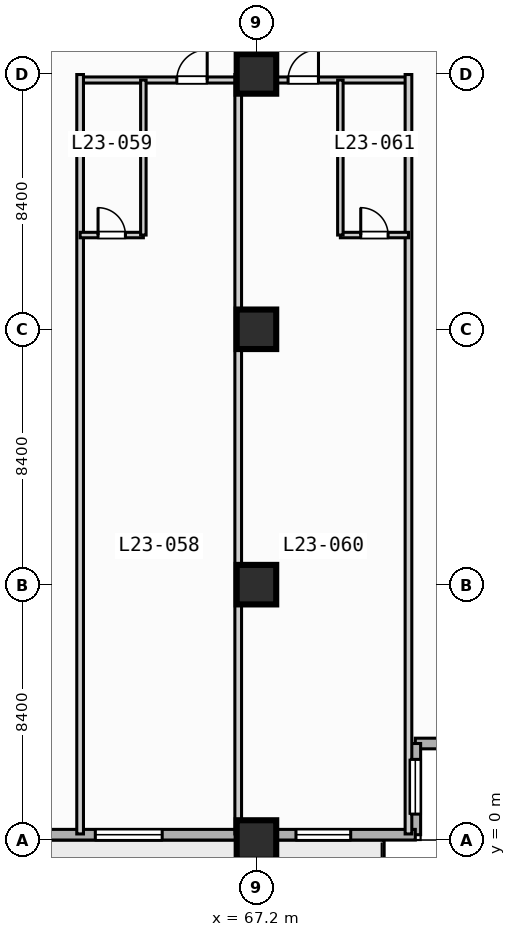
"""IFC4 building model, lengths in metres.
Left out: names, types, materials, properties, quantities, classifications, styles, units other than length and angle.
Written with IfcOpenShell. Run it as: python <this file> out.ifc"""

import sys

from ifc_helpers import new_model, si_unit, direction, frame, frame_2d, origin, origin_2d, place, context, subcontext, project, spatial, rectangle, extrude, element, fill, save


model = new_model("IFC4")
c1 = context("Model", 3, precision=1e-05, world=origin(), true_north=direction((0.0, 1.0)))
c2 = subcontext(c1, "Body", "Model", "MODEL_VIEW")
j1 = project(units=[si_unit("LENGTHUNIT", "METRE"), si_unit("PLANEANGLEUNIT", "RADIAN")], contexts=[c1])
p1 = place(None, origin())
s1 = spatial("IfcSite", under=j1, at=p1, CompositionType="ELEMENT")
p2 = place(p1, origin())
s2 = spatial("IfcBuilding", under=s1, at=p2, CompositionType="ELEMENT")
p3 = place(p2, frame((0.0, 0.0, 100.0)))
s3 = spatial("IfcBuildingStorey", under=s2, at=p3, CompositionType="ELEMENT", Elevation=100.0)
for number, where, z_axis, x_axis in (
    (1, (67.2, 0.0, 0.0), (0.0, 0.0, 1.0), (1.0, 0.0, 0.0)),
    (2, (67.2, 8.4, 0.0), (0.0, 0.0, 1.0), (1.0, 0.0, 0.0)),
    (3, (67.2, 16.8, 0.0), (0.0, 0.0, 1.0), (1.0, 0.0, 0.0)),
    (4, (67.2, 25.2, 0.0), (0.0, 0.0, 1.0), (1.0, 0.0, 0.0)),
):
    element("IfcColumn", number, at=place(p3, frame(where, z_axis=z_axis, x_axis=x_axis)), inside=s3, PredefinedType="COLUMN", context=c2, shape_type="SweptSolid", body=[
        extrude(rectangle(XDim=1.3, YDim=1.3, at=origin_2d()), origin(), (0.0, 0.0, 1.0), 3.8),
    ])
p4 = place(p3, frame((75.425, 3.175, 0.0), z_axis=(0.0, 0.0, 1.0), x_axis=(-1.0, 0.0, 0.0)))
e5 = element("IfcWall", 5, at=p4, inside=s3, PredefinedType="STANDARD", context=c2, shape_type="SweptSolid", body=[
    extrude(rectangle(XDim=3.0, YDim=0.35, at=frame_2d((1.5, 0.0))), origin(), (0.0, 0.0, 1.0), 3.55),
])
p5 = place(p3, frame((72.425, 3.175, 0.0), z_axis=(0.0, 0.0, 1.0), x_axis=(0.0, -1.0, 0.0)))
e6 = element("IfcWall", 6, at=p5, inside=s3, PredefinedType="STANDARD", context=c2, shape_type="SweptSolid", body=[
    extrude(rectangle(XDim=3.0, YDim=0.35, at=frame_2d((1.5, 0.0))), origin(), (0.0, 0.0, 1.0), 3.55),
])
p6 = place(p5, frame((0.522, 0.0, 0.85)))
e7 = element("IfcOpeningElement", 7, at=p6, cuts=e6, PredefinedType="OPENING", context=c2, shape_type="SweptSolid", body=[
    extrude(rectangle(XDim=1.8, YDim=1.8, at=frame_2d((0.9, 0.9))), frame((0.0, 0.185, 0.0), z_axis=(0.0, -1.0, 0.0), x_axis=(1.0, 0.0, 0.0)), (0.0, 0.0, 1.0), 0.37),
])
p7 = place(p3, frame((72.425, 0.175, 0.0), z_axis=(0.0, 0.0, 1.0), x_axis=(-1.0, 0.0, 0.0)))
e8 = element("IfcWall", 8, at=p7, inside=s3, PredefinedType="STANDARD", context=c2, shape_type="SweptSolid", body=[
    extrude(rectangle(XDim=69.25, YDim=0.35, at=frame_2d((34.625, 0.0))), origin(), (0.0, 0.0, 1.0), 3.55),
])
p8 = place(p7, frame((50.225, 0.0, 0.0)))
e9 = element("IfcOpeningElement", 9, at=p8, cuts=e8, PredefinedType="OPENING", context=c2, shape_type="SweptSolid", body=[
    extrude(rectangle(XDim=1.4, YDim=2.2, at=frame_2d((0.7, 1.1))), frame((0.0, 0.185, 0.0), z_axis=(0.0, -1.0, 0.0), x_axis=(1.0, 0.0, 0.0)), (0.0, 0.0, 1.0), 0.37),
])
p9 = place(p7, frame((33.525, 0.0, 0.85)))
e10 = element("IfcOpeningElement", 10, at=p9, cuts=e8, PredefinedType="OPENING", context=c2, shape_type="SweptSolid", body=[
    extrude(rectangle(XDim=2.2, YDim=1.8, at=frame_2d((1.1, 0.9))), frame((0.0, 0.185, 0.0), z_axis=(0.0, -1.0, 0.0), x_axis=(1.0, 0.0, 0.0)), (0.0, 0.0, 1.0), 0.37),
])
p10 = place(p7, frame((25.125, 0.0, 0.85)))
e11 = element("IfcOpeningElement", 11, at=p10, cuts=e8, PredefinedType="OPENING", context=c2, shape_type="SweptSolid", body=[
    extrude(rectangle(XDim=2.2, YDim=1.8, at=frame_2d((1.1, 0.9))), frame((0.0, 0.185, 0.0), z_axis=(0.0, -1.0, 0.0), x_axis=(1.0, 0.0, 0.0)), (0.0, 0.0, 1.0), 0.37),
])
p11 = place(p7, frame((8.325, 0.0, 0.85)))
e12 = element("IfcOpeningElement", 12, at=p11, cuts=e8, PredefinedType="OPENING", context=c2, shape_type="SweptSolid", body=[
    extrude(rectangle(XDim=2.2, YDim=1.8, at=frame_2d((1.1, 0.9))), frame((0.0, 0.185, 0.0), z_axis=(0.0, -1.0, 0.0), x_axis=(1.0, 0.0, 0.0)), (0.0, 0.0, 1.0), 0.37),
])
p12 = place(p7, frame((64.925, 0.0, 0.85)))
e13 = element("IfcOpeningElement", 13, at=p12, cuts=e8, PredefinedType="OPENING", context=c2, shape_type="SweptSolid", body=[
    extrude(rectangle(XDim=1.8, YDim=1.8, at=frame_2d((0.9, 0.9))), frame((0.0, 0.185, 0.0), z_axis=(0.0, -1.0, 0.0), x_axis=(1.0, 0.0, 0.0)), (0.0, 0.0, 1.0), 0.37),
])
p13 = place(p7, frame((56.525, 0.0, 0.85)))
e14 = element("IfcOpeningElement", 14, at=p13, cuts=e8, PredefinedType="OPENING", context=c2, shape_type="SweptSolid", body=[
    extrude(rectangle(XDim=1.8, YDim=1.8, at=frame_2d((0.9, 0.9))), frame((0.0, 0.185, 0.0), z_axis=(0.0, -1.0, 0.0), x_axis=(1.0, 0.0, 0.0)), (0.0, 0.0, 1.0), 0.37),
])
p14 = place(p7, frame((2.125, 0.0, 0.85)))
e15 = element("IfcOpeningElement", 15, at=p14, cuts=e8, PredefinedType="OPENING", context=c2, shape_type="SweptSolid", body=[
    extrude(rectangle(XDim=1.8, YDim=1.8, at=frame_2d((0.9, 0.9))), frame((0.0, 0.185, 0.0), z_axis=(0.0, -1.0, 0.0), x_axis=(1.0, 0.0, 0.0)), (0.0, 0.0, 1.0), 0.37),
])
p15 = place(p3, frame((61.4, 25.0, 0.0), z_axis=(0.0, 0.0, 1.0), x_axis=(1.0, 0.0, 0.0)))
e16 = element("IfcWall", 16, at=p15, inside=s3, PredefinedType="PARTITIONING", context=c2, shape_type="SweptSolid", body=[
    extrude(rectangle(XDim=10.8, YDim=0.2, at=frame_2d((5.4, 0.0))), origin(), (0.0, 0.0, 1.0), 2.8),
])
p16 = place(p15, frame((3.18, 0.0, 0.0)))
e17 = element("IfcOpeningElement", 17, at=p16, cuts=e16, PredefinedType="OPENING", context=c2, shape_type="SweptSolid", body=[
    extrude(rectangle(XDim=1.0, YDim=2.15, at=frame_2d((0.5, 1.075))), frame((0.0, 0.11, 0.0), z_axis=(0.0, -1.0, 0.0), x_axis=(1.0, 0.0, 0.0)), (0.0, 0.0, 1.0), 0.22),
])
p17 = place(p15, frame((6.84, 0.0, 0.0)))
e18 = element("IfcOpeningElement", 18, at=p17, cuts=e16, PredefinedType="OPENING", context=c2, shape_type="SweptSolid", body=[
    extrude(rectangle(XDim=1.0, YDim=2.15, at=frame_2d((0.5, 1.075))), frame((0.0, 0.11, 0.0), z_axis=(0.0, -1.0, 0.0), x_axis=(1.0, 0.0, 0.0)), (0.0, 0.0, 1.0), 0.22),
])
p18 = place(p3, frame((61.4, 0.2, 0.0), z_axis=(0.0, 0.0, 1.0), x_axis=(0.0, 1.0, 0.0)))
e19 = element("IfcWall", 19, at=p18, inside=s3, PredefinedType="PARTITIONING", context=c2, shape_type="SweptSolid", body=[
    extrude(rectangle(XDim=24.98, YDim=0.22, at=frame_2d((12.49, 0.0))), origin(), (0.0, 0.0, 1.0), 3.55),
])
p19 = place(p3, frame((61.4, 19.9, 0.0), z_axis=(0.0, 0.0, 1.0), x_axis=(1.0, 0.0, 0.0)))
e20 = element("IfcWall", 20, at=p19, inside=s3, PredefinedType="PLUMBINGWALL", context=c2, shape_type="SweptSolid", body=[
    extrude(rectangle(XDim=2.08, YDim=0.18, at=frame_2d((1.04, 0.0))), origin(), (0.0, 0.0, 1.0), 3.55),
])
p20 = place(p19, frame((0.59, 0.0, 0.0)))
e21 = element("IfcOpeningElement", 21, at=p20, cuts=e20, PredefinedType="OPENING", context=c2, shape_type="SweptSolid", body=[
    extrude(rectangle(XDim=0.9, YDim=2.1, at=frame_2d((0.45, 1.05))), frame((0.0, 0.1, 0.0), z_axis=(0.0, -1.0, 0.0), x_axis=(1.0, 0.0, 0.0)), (0.0, 0.0, 1.0), 0.2),
])
p21 = place(p3, frame((63.48, 19.9, 0.0), z_axis=(0.0, 0.0, 1.0), x_axis=(0.0, 1.0, 0.0)))
e22 = element("IfcWall", 22, at=p21, inside=s3, PredefinedType="PLUMBINGWALL", context=c2, shape_type="SweptSolid", body=[
    extrude(rectangle(XDim=5.1, YDim=0.18, at=frame_2d((2.55, 0.0))), origin(), (0.0, 0.0, 1.0), 3.55),
])
for number, where, z_axis, x_axis in (
    (23, (66.6, 0.2, 0.0), (0.0, 0.0, 1.0), (0.0, 1.0, 0.0)),
    (24, (72.2, 0.2, 0.0), (0.0, 0.0, 1.0), (0.0, 1.0, 0.0)),
):
    element("IfcWall", number, at=place(p3, frame(where, z_axis=z_axis, x_axis=x_axis)), inside=s3, PredefinedType="PARTITIONING", context=c2, shape_type="SweptSolid", body=[
        extrude(rectangle(XDim=24.98, YDim=0.22, at=frame_2d((12.49, 0.0))), origin(), (0.0, 0.0, 1.0), 3.55),
    ])
p22 = place(p3, frame((69.96, 19.9, 0.0), z_axis=(0.0, 0.0, 1.0), x_axis=(1.0, 0.0, 0.0)))
e25 = element("IfcWall", 25, at=p22, inside=s3, PredefinedType="PLUMBINGWALL", context=c2, shape_type="SweptSolid", body=[
    extrude(rectangle(XDim=2.24, YDim=0.18, at=frame_2d((1.12, 0.0))), origin(), (0.0, 0.0, 1.0), 3.55),
])
p23 = place(p22, frame((0.67, 0.0, 0.0)))
e26 = element("IfcOpeningElement", 26, at=p23, cuts=e25, PredefinedType="OPENING", context=c2, shape_type="SweptSolid", body=[
    extrude(rectangle(XDim=0.9, YDim=2.1, at=frame_2d((0.45, 1.05))), frame((0.0, 0.1, 0.0), z_axis=(0.0, -1.0, 0.0), x_axis=(1.0, 0.0, 0.0)), (0.0, 0.0, 1.0), 0.2),
])
p24 = place(p3, frame((69.96, 19.9, 0.0), z_axis=(0.0, 0.0, 1.0), x_axis=(0.0, 1.0, 0.0)))
e27 = element("IfcWall", 27, at=p24, inside=s3, PredefinedType="PLUMBINGWALL", context=c2, shape_type="SweptSolid", body=[
    extrude(rectangle(XDim=5.1, YDim=0.18, at=frame_2d((2.55, 0.0))), origin(), (0.0, 0.0, 1.0), 3.55),
])
p25 = place(p6, origin())
e28 = element("IfcWindow", 28, at=p25, inside=s3, PartitioningType="SINGLE_PANEL", PredefinedType="WINDOW", context=c2, shape_type="SweptSolid", body=[
    extrude(rectangle(XDim=1.8, YDim=1.8, at=frame_2d((0.9, 0.9))), frame((0.0, 0.03, 0.0), z_axis=(0.0, -1.0, 0.0), x_axis=(1.0, 0.0, 0.0)), (0.0, 0.0, 1.0), 0.06),
])
fill(e7, e28)
p26 = place(p11, origin())
e29 = element("IfcWindow", 29, at=p26, inside=s3, PartitioningType="SINGLE_PANEL", PredefinedType="WINDOW", context=c2, shape_type="SweptSolid", body=[
    extrude(rectangle(XDim=2.2, YDim=1.8, at=frame_2d((1.1, 0.9))), frame((0.0, 0.03, 0.0), z_axis=(0.0, -1.0, 0.0), x_axis=(1.0, 0.0, 0.0)), (0.0, 0.0, 1.0), 0.06),
])
fill(e12, e29)
p27 = place(p14, origin())
e30 = element("IfcWindow", 30, at=p27, inside=s3, PartitioningType="SINGLE_PANEL", PredefinedType="WINDOW", context=c2, shape_type="SweptSolid", body=[
    extrude(rectangle(XDim=1.8, YDim=1.8, at=frame_2d((0.9, 0.9))), frame((0.0, 0.03, 0.0), z_axis=(0.0, -1.0, 0.0), x_axis=(1.0, 0.0, 0.0)), (0.0, 0.0, 1.0), 0.06),
])
fill(e15, e30)
p28 = place(p16, origin())
e31 = element("IfcDoor", 31, at=p28, inside=s3, OperationType="SINGLE_SWING_RIGHT", PredefinedType="DOOR", context=c2, shape_type="SweptSolid", body=[
    extrude(rectangle(XDim=1.0, YDim=2.15, at=frame_2d((0.5, 1.075))), frame((0.0, 0.025, 0.0), z_axis=(0.0, -1.0, 0.0), x_axis=(1.0, 0.0, 0.0)), (0.0, 0.0, 1.0), 0.05),
])
fill(e17, e31)
p29 = place(p17, origin())
e32 = element("IfcDoor", 32, at=p29, inside=s3, OperationType="SINGLE_SWING_RIGHT", PredefinedType="DOOR", context=c2, shape_type="SweptSolid", body=[
    extrude(rectangle(XDim=1.0, YDim=2.15, at=frame_2d((0.5, 1.075))), frame((0.0, 0.025, 0.0), z_axis=(0.0, -1.0, 0.0), x_axis=(1.0, 0.0, 0.0)), (0.0, 0.0, 1.0), 0.05),
])
fill(e18, e32)
p30 = place(p20, origin())
e33 = element("IfcDoor", 33, at=p30, inside=s3, OperationType="SINGLE_SWING_LEFT", PredefinedType="DOOR", context=c2, shape_type="SweptSolid", body=[
    extrude(rectangle(XDim=0.9, YDim=2.1, at=frame_2d((0.45, 1.05))), frame((0.0, 0.025, 0.0), z_axis=(0.0, -1.0, 0.0), x_axis=(1.0, 0.0, 0.0)), (0.0, 0.0, 1.0), 0.05),
])
fill(e21, e33)
p31 = place(p23, origin())
e34 = element("IfcDoor", 34, at=p31, inside=s3, OperationType="SINGLE_SWING_LEFT", PredefinedType="DOOR", context=c2, shape_type="SweptSolid", body=[
    extrude(rectangle(XDim=0.9, YDim=2.1, at=frame_2d((0.45, 1.05))), frame((0.0, 0.025, 0.0), z_axis=(0.0, -1.0, 0.0), x_axis=(1.0, 0.0, 0.0)), (0.0, 0.0, 1.0), 0.05),
])
fill(e26, e34)
save(model, sys.argv[1])
